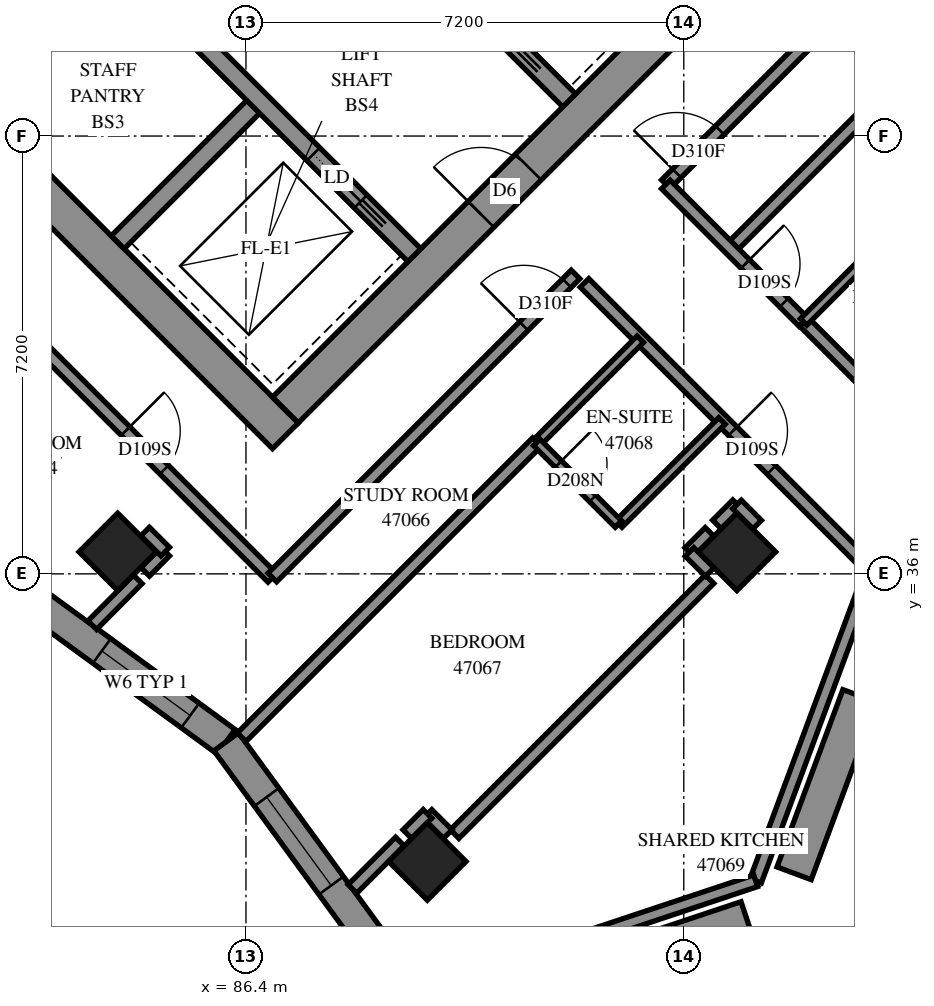
"""IFC4 building model, lengths in metres.
Left out: names, types, materials, properties, quantities, classifications, styles, units other than length and angle.
Written with IfcOpenShell. Run it as: python <this file> out.ifc"""

import sys

from ifc_helpers import new_model, si_unit, direction, frame, frame_2d, origin, origin_2d, place, context, subcontext, project, spatial, polyline, rectangle, outline, extrude, element, fill, save


model = new_model("IFC4")
c1 = context("Model", 3, precision=1e-05, world=origin(), true_north=direction((0.0, 1.0)))
c2 = subcontext(c1, "Body", "Model", "MODEL_VIEW")
j1 = project(units=[si_unit("LENGTHUNIT", "METRE"), si_unit("PLANEANGLEUNIT", "RADIAN")], contexts=[c1])
p1 = place(None, origin())
s1 = spatial("IfcSite", under=j1, at=p1, CompositionType="ELEMENT")
p2 = place(p1, origin())
s2 = spatial("IfcBuilding", under=s1, at=p2, CompositionType="ELEMENT")
p3 = place(p2, frame((0.0, 0.0, 172.8)))
s3 = spatial("IfcBuildingStorey", under=s2, at=p3, CompositionType="ELEMENT", Elevation=172.8)
for number, where, z_axis, x_axis in (
    (1, (84.291, 36.362, 0.0), (0.0, 0.0, 1.0), (0.707, -0.707, 0.0)),
    (2, (94.474, 36.362, 0.0), (0.0, 0.0, 1.0), (0.707, -0.707, 0.0)),
    (3, (89.382, 31.271, 0.0), (0.0, 0.0, 1.0), (0.707, -0.707, 0.0)),
):
    element("IfcColumn", number, at=place(p3, frame(where, z_axis=z_axis, x_axis=x_axis)), inside=s3, PredefinedType="COLUMN", context=c2, shape_type="SweptSolid", body=[
        extrude(rectangle(XDim=0.9, YDim=0.9, at=origin_2d()), origin(), (0.0, 0.0, 1.0), 3.1),
    ])
p4 = place(p3, frame((76.018, 49.302, -0.3), z_axis=(0.0, 0.0, 1.0), x_axis=(0.7071067812, -0.7071067812, 0.0)))
e4 = element("IfcWall", 4, at=p4, inside=s3, PredefinedType="SHEAR", context=c2, shape_type="SweptSolid", body=[
    extrude(rectangle(XDim=15.6, YDim=0.6, at=frame_2d((7.8, 0.0))), origin(), (0.0, 0.0, 1.0), 2.7),
])
p5 = place(p3, frame((87.049, 38.695, -0.3), z_axis=(0.0, 0.0, 1.0), x_axis=(0.7071067812, 0.7071067812, 0.0)))
e5 = element("IfcWall", 5, at=p5, inside=s3, PredefinedType="SHEAR", context=c2, shape_type="SweptSolid", body=[
    extrude(rectangle(XDim=14.4, YDim=0.6, at=frame_2d((7.2, 0.0))), origin(), (0.0, 0.0, 1.0), 2.7),
])
p6 = place(p5, frame((4.55, 0.0, 0.3)))
e6 = element("IfcOpeningElement", 6, at=p6, cuts=e5, PredefinedType="OPENING", context=c2, shape_type="SweptSolid", body=[
    extrude(rectangle(XDim=1.1, YDim=2.1, at=frame_2d((0.55, 1.05))), frame((0.0, 0.31, 0.0), z_axis=(0.0, -1.0, 0.0), x_axis=(1.0, 0.0, 0.0)), (0.0, 0.0, 1.0), 0.62),
])
p7 = place(p5, frame((11.35, 0.0, 0.3)))
e7 = element("IfcOpeningElement", 7, at=p7, cuts=e5, PredefinedType="OPENING", context=c2, shape_type="SweptSolid", body=[
    extrude(rectangle(XDim=1.1, YDim=2.1, at=frame_2d((0.55, 1.05))), frame((0.0, 0.31, 0.0), z_axis=(0.0, -1.0, 0.0), x_axis=(1.0, 0.0, 0.0)), (0.0, 0.0, 1.0), 0.62),
])
for number, where, z_axis, x_axis in (
    (8, (81.746, 43.999, 0.0), (0.0, 0.0, 1.0), (0.707, 0.707, 0.0)),
    (9, (84.291, 41.453, 0.0), (0.0, 0.0, 1.0), (0.707, 0.707, 0.0)),
):
    element("IfcWall", number, at=place(p3, frame(where, z_axis=z_axis, x_axis=x_axis)), inside=s3, PredefinedType="SOLIDWALL", context=c2, shape_type="SweptSolid", body=[
        extrude(rectangle(XDim=3.3, YDim=0.3, at=frame_2d((1.65, 0.0))), origin(), (0.0, 0.0, 1.0), 3.1),
    ])
p8 = place(p3, frame((78.988, 51.423, 0.0), z_axis=(0.0, 0.0, 1.0), x_axis=(0.7071067812, -0.7071067812, 0.0)))
e10 = element("IfcWall", 10, at=p8, inside=s3, PredefinedType="SOLIDWALL", context=c2, shape_type="SweptSolid", body=[
    extrude(rectangle(XDim=14.4, YDim=0.3, at=frame_2d((7.2, 0.0))), origin(), (0.0, 0.0, 1.0), 3.1),
])
p9 = place(p8, frame((1.35, 0.0, 0.0)))
e11 = element("IfcOpeningElement", 11, at=p9, cuts=e10, PredefinedType="OPENING", context=c2, shape_type="SweptSolid", body=[
    extrude(rectangle(XDim=0.9, YDim=2.1, at=frame_2d((0.45, 1.05))), frame((0.0, 0.16, 0.0), z_axis=(0.0, -1.0, 0.0), x_axis=(1.0, 0.0, 0.0)), (0.0, 0.0, 1.0), 0.32),
])
p10 = place(p8, frame((4.95, 0.0, 0.0)))
e12 = element("IfcOpeningElement", 12, at=p10, cuts=e10, PredefinedType="OPENING", context=c2, shape_type="SweptSolid", body=[
    extrude(rectangle(XDim=0.9, YDim=2.1, at=frame_2d((0.45, 1.05))), frame((0.0, 0.16, 0.0), z_axis=(0.0, -1.0, 0.0), x_axis=(1.0, 0.0, 0.0)), (0.0, 0.0, 1.0), 0.32),
])
p11 = place(p8, frame((8.55, 0.0, 0.0)))
e13 = element("IfcOpeningElement", 13, at=p11, cuts=e10, PredefinedType="OPENING", context=c2, shape_type="SweptSolid", body=[
    extrude(rectangle(XDim=0.9, YDim=2.1, at=frame_2d((0.45, 1.05))), frame((0.0, 0.16, 0.0), z_axis=(0.0, -1.0, 0.0), x_axis=(1.0, 0.0, 0.0)), (0.0, 0.0, 1.0), 0.32),
])
p12 = place(p8, frame((12.05, 0.0, 0.0)))
e14 = element("IfcOpeningElement", 14, at=p12, cuts=e10, PredefinedType="OPENING", context=c2, shape_type="SweptSolid", body=[
    extrude(rectangle(XDim=1.1, YDim=2.1, at=frame_2d((0.55, 1.05))), frame((0.0, 0.16, 0.0), z_axis=(0.0, -1.0, 0.0), x_axis=(1.0, 0.0, 0.0)), (0.0, 0.0, 1.0), 0.32),
])
p13 = place(p3, frame((81.534, 53.969, 0.0), z_axis=(0.0, 0.0, 1.0), x_axis=(0.707103309, -0.7071102534, 0.0)))
e15 = element("IfcWall", 15, at=p13, inside=s3, PredefinedType="SOLIDWALL", context=c2, shape_type="SweptSolid", body=[
    extrude(rectangle(XDim=14.4, YDim=0.3, at=frame_2d((7.2, 0.0))), origin(), (0.0, 0.0, 1.0), 3.1),
])
p14 = place(p13, frame((1.25, 0.0, 0.0)))
e16 = element("IfcOpeningElement", 16, at=p14, cuts=e15, PredefinedType="OPENING", context=c2, shape_type="SweptSolid", body=[
    extrude(rectangle(XDim=1.1, YDim=2.1, at=frame_2d((0.55, 1.05))), frame((0.0, 0.16, 0.0), z_axis=(0.0, -1.0, 0.0), x_axis=(1.0, 0.0, 0.0)), (0.0, 0.0, 1.0), 0.32),
])
p15 = place(p13, frame((4.85, 0.0, 0.0)))
e17 = element("IfcOpeningElement", 17, at=p15, cuts=e15, PredefinedType="OPENING", context=c2, shape_type="SweptSolid", body=[
    extrude(rectangle(XDim=1.1, YDim=2.1, at=frame_2d((0.55, 1.05))), frame((0.0, 0.16, 0.0), z_axis=(0.0, -1.0, 0.0), x_axis=(1.0, 0.0, 0.0)), (0.0, 0.0, 1.0), 0.32),
])
p16 = place(p13, frame((8.45, 0.0, 0.0)))
e18 = element("IfcOpeningElement", 18, at=p16, cuts=e15, PredefinedType="OPENING", context=c2, shape_type="SweptSolid", body=[
    extrude(rectangle(XDim=1.1, YDim=2.1, at=frame_2d((0.55, 1.05))), frame((0.0, 0.16, 0.0), z_axis=(0.0, -1.0, 0.0), x_axis=(1.0, 0.0, 0.0)), (0.0, 0.0, 1.0), 0.32),
])
p17 = place(p13, frame((12.05, 0.0, 0.0)))
e19 = element("IfcOpeningElement", 19, at=p17, cuts=e15, PredefinedType="OPENING", context=c2, shape_type="SweptSolid", body=[
    extrude(rectangle(XDim=1.1, YDim=2.1, at=frame_2d((0.55, 1.05))), frame((0.0, 0.16, 0.0), z_axis=(0.0, -1.0, 0.0), x_axis=(1.0, 0.0, 0.0)), (0.0, 0.0, 1.0), 0.32),
])
p18 = place(p3, frame((82.771, 35.652, 0.0), z_axis=(0.0, 0.0, 1.0), x_axis=(0.807533929, -0.58982112, 0.0)))
e20 = element("IfcWall", 20, at=p18, inside=s3, PredefinedType="SOLIDWALL", context=c2, shape_type="SweptSolid", body=[
    extrude(outline(polyline([(-0.039, -0.25), (4.053, -0.25), (4.131, 0.25), (0.039, 0.25), (-0.039, -0.25)])), origin(), (0.0, 0.0, 1.0), 3.1),
])
p19 = place(p18, frame((1.559, 0.0, 0.7)))
e21 = element("IfcOpeningElement", 21, at=p19, cuts=e20, PredefinedType="OPENING", context=c2, shape_type="SweptSolid", body=[
    extrude(rectangle(XDim=1.8, YDim=2.2, at=frame_2d((0.9, 1.1))), frame((0.0, 0.26, 0.0), z_axis=(0.0, -1.0, 0.0), x_axis=(1.0, 0.0, 0.0)), (0.0, 0.0, 1.0), 0.52),
])
p20 = place(p3, frame((86.075, 33.239, 0.0), z_axis=(0.0, 0.0, 1.0), x_axis=(0.5898094806, -0.8075424302, 0.0)))
e22 = element("IfcWall", 22, at=p20, inside=s3, PredefinedType="SOLIDWALL", context=c2, shape_type="SweptSolid", body=[
    extrude(outline(polyline([(0.039, -0.25), (4.131, -0.25), (4.053, 0.25), (-0.039, 0.25), (0.039, -0.25)])), origin(), (0.0, 0.0, 1.0), 3.1),
])
p21 = place(p20, frame((1.127, 0.0, 0.7)))
e23 = element("IfcOpeningElement", 23, at=p21, cuts=e22, PredefinedType="OPENING", context=c2, shape_type="SweptSolid", body=[
    extrude(rectangle(XDim=1.8, YDim=2.1, at=frame_2d((0.9, 1.05))), frame((0.0, 0.26, 0.0), z_axis=(0.0, -1.0, 0.0), x_axis=(1.0, 0.0, 0.0)), (0.0, 0.0, 1.0), 0.52),
])
p22 = place(p3, frame((96.623, 35.909, 0.0), z_axis=(0.0, 0.0, 1.0), x_axis=(-0.3481832062, -0.9374265064, 0.0)))
e24 = element("IfcWall", 24, at=p22, inside=s3, PredefinedType="PARAPET", context=c2, shape_type="SweptSolid", body=[
    extrude(outline(polyline([(-0.046, -0.1), (5.24, -0.1), (5.336, 0.1), (0.046, 0.1), (-0.046, -0.1)])), origin(), (0.0, 0.0, 1.0), 0.25),
])
p23 = place(p3, frame((94.782, 30.952, 0.0), z_axis=(0.0, 0.0, 1.0), x_axis=(-0.9486813956, -0.3162334732, 0.0)))
e25 = element("IfcWall", 25, at=p23, inside=s3, PredefinedType="PARAPET", context=c2, shape_type="SweptSolid", body=[
    extrude(outline(polyline([(0.048, -0.1), (5.257, -0.1), (5.257, 0.1), (-0.048, 0.1), (0.048, -0.1)])), origin(), (0.0, 0.0, 1.0), 0.25),
])
p24 = place(p3, frame((96.498, 33.992, 0.0), z_axis=(0.0, 0.0, 1.0), x_axis=(-0.3481905653, -0.937423773, 0.0)))
e26 = element("IfcWall", 26, at=p24, inside=s3, PredefinedType="SOLIDWALL", context=c2, shape_type="SweptSolid", body=[
    extrude(rectangle(XDim=3.111, YDim=0.6, at=frame_2d((1.555, 0.0))), origin(), (0.0, 0.0, 1.0), 0.65),
])
p25 = place(p3, frame((94.366, 41.348, 0.0), z_axis=(0.0, 0.0, 1.0), x_axis=(0.7071108825, 0.7071026798, 0.0)))
e27 = element("IfcWall", 27, at=p25, inside=s3, PredefinedType="PARTITIONING", context=c2, shape_type="SweptSolid", body=[
    extrude(rectangle(XDim=12.191, YDim=0.2, at=frame_2d((6.096, 0.0))), origin(), (0.0, 0.0, 1.0), 3.1),
])
p26 = place(p3, frame((91.967, 40.785, 0.0), z_axis=(0.0, 0.0, 1.0), x_axis=(0.7071067812, -0.7071067812, 0.0)))
e28 = element("IfcWall", 28, at=p26, inside=s3, PredefinedType="PARTITIONING", context=c2, shape_type="SweptSolid", body=[
    extrude(rectangle(XDim=12.1, YDim=0.2, at=frame_2d((6.05, 0.0))), origin(), (0.0, 0.0, 1.0), 3.1),
])
p27 = place(p26, frame((3.448, 0.0, 0.0)))
e29 = element("IfcOpeningElement", 29, at=p27, cuts=e28, PredefinedType="OPENING", context=c2, shape_type="SweptSolid", body=[
    extrude(rectangle(XDim=0.9, YDim=2.1, at=frame_2d((0.45, 1.05))), frame((0.0, 0.11, 0.0), z_axis=(0.0, -1.0, 0.0), x_axis=(1.0, 0.0, 0.0)), (0.0, 0.0, 1.0), 0.22),
])
p28 = place(p26, frame((8.457, 0.0, 0.0)))
e30 = element("IfcOpeningElement", 30, at=p28, cuts=e28, PredefinedType="OPENING", context=c2, shape_type="SweptSolid", body=[
    extrude(rectangle(XDim=1.0, YDim=2.1, at=frame_2d((0.5, 1.05))), frame((0.0, 0.11, 0.0), z_axis=(0.0, -1.0, 0.0), x_axis=(1.0, 0.0, 0.0)), (0.0, 0.0, 1.0), 0.22),
])
p29 = place(p3, frame((93.306, 42.408, 0.0), z_axis=(0.0, 0.0, 1.0), x_axis=(0.7071067812, 0.7071067812, 0.0)))
e31 = element("IfcWall", 31, at=p29, inside=s3, PredefinedType="PARTITIONING", context=c2, shape_type="SweptSolid", body=[
    extrude(rectangle(XDim=9.45, YDim=0.2, at=frame_2d((4.725, 0.0))), origin(), (0.0, 0.0, 1.0), 3.1),
])
p30 = place(p29, frame((0.253, 0.0, 0.0)))
e32 = element("IfcOpeningElement", 32, at=p30, cuts=e31, PredefinedType="OPENING", context=c2, shape_type="SweptSolid", body=[
    extrude(rectangle(XDim=1.0, YDim=2.1, at=frame_2d((0.5, 1.05))), frame((0.0, 0.11, 0.0), z_axis=(0.0, -1.0, 0.0), x_axis=(1.0, 0.0, 0.0)), (0.0, 0.0, 1.0), 0.22),
])
p31 = place(p3, frame((80.899, 41.869, 0.0), z_axis=(0.0, 0.0, 1.0), x_axis=(0.7071067812, -0.7071067812, 0.0)))
e33 = element("IfcWall", 33, at=p31, inside=s3, PredefinedType="PARTITIONING", context=c2, shape_type="SweptSolid", body=[
    extrude(rectangle(XDim=8.392, YDim=0.2, at=frame_2d((4.196, 0.0))), origin(), (0.0, 0.0, 1.0), 3.1),
])
p32 = place(p31, frame((4.979, 0.0, 0.0)))
e34 = element("IfcOpeningElement", 34, at=p32, cuts=e33, PredefinedType="OPENING", context=c2, shape_type="SweptSolid", body=[
    extrude(rectangle(XDim=0.9, YDim=2.1, at=frame_2d((0.45, 1.05))), frame((0.0, 0.11, 0.0), z_axis=(0.0, -1.0, 0.0), x_axis=(1.0, 0.0, 0.0)), (0.0, 0.0, 1.0), 0.22),
])
p33 = place(p3, frame((86.834, 35.94, 0.0), z_axis=(0.0, 0.0, 1.0), x_axis=(0.7072486139, 0.7069649201, 0.0)))
e35 = element("IfcWall", 35, at=p33, inside=s3, PredefinedType="PARTITIONING", context=c2, shape_type="SweptSolid", body=[
    extrude(rectangle(XDim=7.05, YDim=0.2, at=frame_2d((3.525, 0.0))), origin(), (0.0, 0.0, 1.0), 3.1),
])
p34 = place(p33, frame((5.848, 0.0, 0.0)))
e36 = element("IfcOpeningElement", 36, at=p34, cuts=e35, PredefinedType="OPENING", context=c2, shape_type="SweptSolid", body=[
    extrude(rectangle(XDim=1.0, YDim=2.1, at=frame_2d((0.5, 1.05))), frame((0.0, 0.11, 0.0), z_axis=(0.0, -1.0, 0.0), x_axis=(1.0, 0.0, 0.0)), (0.0, 0.0, 1.0), 0.22),
])
p35 = place(p3, frame((86.33, 33.314, 0.0), z_axis=(0.0, 0.0, 1.0), x_axis=(0.7072524653, 0.7069610671, 0.0)))
e37 = element("IfcWall", 37, at=p35, inside=s3, PredefinedType="PARTITIONING", context=c2, shape_type="SweptSolid", body=[
    extrude(rectangle(XDim=6.864, YDim=0.2, at=frame_2d((3.432, 0.0))), origin(), (0.0, 0.0, 1.0), 3.1),
])
p36 = place(p3, frame((89.831, 31.721, 0.0), z_axis=(0.0, 0.0, 1.0), x_axis=(0.7071067812, 0.7071067812, 0.0)))
e38 = element("IfcWall", 38, at=p36, inside=s3, PredefinedType="PARTITIONING", context=c2, shape_type="SweptSolid", body=[
    extrude(rectangle(XDim=5.928, YDim=0.2, at=frame_2d((2.964, 0.0))), origin(), (0.0, 0.0, 1.0), 2.6),
])
p37 = place(p3, frame((94.923, 26.631, 0.0), z_axis=(0.0, 0.0, 1.0), x_axis=(0.7071067812, 0.7071067812, 0.0)))
e39 = element("IfcWall", 39, at=p37, inside=s3, PredefinedType="PARTITIONING", context=c2, shape_type="SweptSolid", body=[
    extrude(rectangle(XDim=5.926, YDim=0.2, at=frame_2d((2.963, 0.0))), origin(), (0.0, 0.0, 1.0), 3.1),
])
p38 = place(p3, frame((95.573, 40.148, 0.0), z_axis=(0.0, 0.0, 1.0), x_axis=(0.7068698107, -0.7073436723, 0.0)))
e40 = element("IfcWall", 40, at=p38, inside=s3, PredefinedType="PARTITIONING", context=c2, shape_type="SweptSolid", body=[
    extrude(rectangle(XDim=3.799, YDim=0.2, at=frame_2d((1.899, 0.0))), origin(), (0.0, 0.0, 1.0), 3.1),
])
p39 = place(p3, frame((93.305, 42.403, 0.0), z_axis=(0.0, 0.0, 1.0), x_axis=(0.7071067812, -0.7071067812, 0.0)))
e41 = element("IfcWall", 41, at=p39, inside=s3, PredefinedType="PARTITIONING", context=c2, shape_type="SweptSolid", body=[
    extrude(rectangle(XDim=3.199, YDim=0.2, at=frame_2d((1.599, 0.0))), origin(), (0.0, 0.0, 1.0), 3.1),
])
p40 = place(p39, frame((1.848, 0.0, 0.0)))
e42 = element("IfcOpeningElement", 42, at=p40, cuts=e41, PredefinedType="OPENING", context=c2, shape_type="SweptSolid", body=[
    extrude(rectangle(XDim=0.9, YDim=2.1, at=frame_2d((0.45, 1.05))), frame((0.0, 0.11, 0.0), z_axis=(0.0, -1.0, 0.0), x_axis=(1.0, 0.0, 0.0)), (0.0, 0.0, 1.0), 0.22),
])
for number, where, z_axis, x_axis in (
    (43, (95.571, 40.143, 0.0), (0.0, 0.0, 1.0), (0.707, 0.708, 0.0)),
    (44, (91.189, 38.161, 0.0), (0.0, 0.0, 1.0), (0.707, 0.708, 0.0)),
    (45, (92.531, 36.819, 0.0), (0.0, 0.0, 1.0), (0.708, 0.707, 0.0)),
):
    element("IfcWall", number, at=place(p3, frame(where, z_axis=z_axis, x_axis=x_axis)), inside=s3, PredefinedType="PARTITIONING", context=c2, shape_type="SweptSolid", body=[
        extrude(rectangle(XDim=2.4, YDim=0.15, at=frame_2d((1.2, 0.0))), origin(), (0.0, 0.0, 1.0), 3.1),
    ])
p41 = place(p3, frame((91.183, 38.161, 0.0), z_axis=(0.0, 0.0, 1.0), x_axis=(0.7071067812, -0.7071067812, 0.0)))
e46 = element("IfcWall", 46, at=p41, inside=s3, PredefinedType="PARTITIONING", context=c2, shape_type="SweptSolid", body=[
    extrude(rectangle(XDim=1.898, YDim=0.15, at=frame_2d((0.949, 0.0))), origin(), (0.0, 0.0, 1.0), 3.1),
])
p42 = place(p41, frame((0.501, 0.0, 0.0)))
e47 = element("IfcOpeningElement", 47, at=p42, cuts=e46, PredefinedType="OPENING", context=c2, shape_type="SweptSolid", body=[
    extrude(rectangle(XDim=0.8, YDim=2.1, at=frame_2d((0.4, 1.05))), frame((0.0, 0.085, 0.0), z_axis=(0.0, -1.0, 0.0), x_axis=(1.0, 0.0, 0.0)), (0.0, 0.0, 1.0), 0.17),
])
p43 = place(p3, frame((88.152, 30.819, 0.0), z_axis=(0.0, 0.0, 1.0), x_axis=(0.7070614204, 0.7071521391, 0.0)))
e48 = element("IfcWall", 48, at=p43, inside=s3, PredefinedType="PARTITIONING", context=c2, shape_type="SweptSolid", body=[
    extrude(rectangle(XDim=1.102, YDim=0.2, at=frame_2d((0.551, 0.0))), origin(), (0.0, 0.0, 1.0), 3.1),
])
p44 = place(p3, frame((83.872, 35.157, 0.0), z_axis=(0.0, 0.0, 1.0), x_axis=(0.7052194116, 0.7089891265, 0.0)))
e49 = element("IfcWall", 49, at=p44, inside=s3, PredefinedType="PARTITIONING", context=c2, shape_type="SweptSolid", body=[
    extrude(rectangle(XDim=1.061, YDim=0.2, at=frame_2d((0.53, 0.0))), origin(), (0.0, 0.0, 1.0), 3.1),
])
for number, where, z_axis, x_axis in (
    (50, (94.145, 36.813, 0.0), (0.0, 0.0, 1.0), (0.707, 0.707, 0.0)),
    (51, (89.386, 32.052, 0.0), (0.0, 0.0, 1.0), (0.707, -0.707, 0.0)),
    (52, (89.053, 31.721, 0.0), (0.0, 0.0, 1.0), (0.707, 0.707, 0.0)),
    (53, (93.691, 36.359, 0.0), (0.0, 0.0, 1.0), (0.707, 0.707, 0.0)),
):
    element("IfcWall", number, at=place(p3, frame(where, z_axis=z_axis, x_axis=x_axis)), inside=s3, PredefinedType="PARTITIONING", context=c2, shape_type="SweptSolid", body=[
        extrude(rectangle(XDim=0.469, YDim=0.2, at=frame_2d((0.235, 0.0))), origin(), (0.0, 0.0, 1.0), 3.1),
    ])
for number, where, z_axis, x_axis in (
    (54, (94.476, 37.142, 0.0), (0.0, 0.0, 1.0), (0.705, -0.709, 0.0)),
    (55, (84.742, 36.034, 0.0), (0.0, 0.0, 1.0), (0.705, 0.709, 0.0)),
    (56, (93.695, 36.361, 0.0), (0.0, 0.0, 1.0), (0.709, -0.705, 0.0)),
):
    element("IfcWall", number, at=place(p3, frame(where, z_axis=z_axis, x_axis=x_axis)), inside=s3, PredefinedType="PARTITIONING", context=c2, shape_type="SweptSolid", body=[
        extrude(rectangle(XDim=0.468, YDim=0.2, at=frame_2d((0.234, 0.0))), origin(), (0.0, 0.0, 1.0), 3.1),
    ])
p45 = place(p3, frame((84.742, 36.696, 0.0), z_axis=(0.0, 0.0, 1.0), x_axis=(0.7071067812, -0.7071067812, 0.0)))
e57 = element("IfcWall", 57, at=p45, inside=s3, PredefinedType="PARTITIONING", context=c2, shape_type="SweptSolid", body=[
    extrude(rectangle(XDim=0.467, YDim=0.2, at=frame_2d((0.233, 0.0))), origin(), (0.0, 0.0, 1.0), 3.1),
])
p46 = place(p3, frame((94.636, 30.324, 0.0), z_axis=(0.0, 0.0, 1.0), x_axis=(-0.9486862934, -0.31621878, 0.0)))
e58 = element("IfcWall", 58, at=p46, inside=s3, PredefinedType="SOLIDWALL", context=c2, shape_type="SweptSolid", body=[
    extrude(outline(polyline([(0.0, -0.3), (3.338, -0.3), (3.338, 0.3), (0.0, 0.3), (0.0, -0.3)])), origin(), (0.0, 0.0, 1.0), 0.65),
])
p47 = place(p21, origin())
e59 = element("IfcWindow", 59, at=p47, inside=s3, PartitioningType="SINGLE_PANEL", PredefinedType="WINDOW", context=c2, shape_type="SweptSolid", body=[
    extrude(rectangle(XDim=1.8, YDim=2.1, at=frame_2d((0.9, 1.05))), frame((0.0, 0.18, 0.0), z_axis=(0.0, -1.0, 0.0), x_axis=(1.0, 0.0, 0.0)), (0.0, 0.0, 1.0), 0.06),
])
fill(e23, e59)
p48 = place(p6, origin())
e60 = element("IfcDoor", 60, at=p48, inside=s3, OperationType="DOUBLE_DOOR_SINGLE_SWING", PredefinedType="DOOR", context=c2, shape_type="SweptSolid", body=[
    extrude(rectangle(XDim=1.1, YDim=2.1, at=frame_2d((0.55, 1.05))), frame((0.0, 0.025, 0.0), z_axis=(0.0, -1.0, 0.0), x_axis=(1.0, 0.0, 0.0)), (0.0, 0.0, 1.0), 0.05),
])
fill(e6, e60)
p49 = place(p12, origin())
e61 = element("IfcDoor", 61, at=p49, inside=s3, OperationType="SLIDING_TO_RIGHT", PredefinedType="DOOR", context=c2, shape_type="SweptSolid", body=[
    extrude(rectangle(XDim=1.1, YDim=2.1, at=frame_2d((0.55, 1.05))), frame((0.0, 0.025, 0.0), z_axis=(0.0, -1.0, 0.0), x_axis=(1.0, 0.0, 0.0)), (0.0, 0.0, 1.0), 0.05),
])
fill(e14, e61)
p50 = place(p30, origin())
e62 = element("IfcDoor", 62, at=p50, inside=s3, OperationType="SINGLE_SWING_RIGHT", PredefinedType="DOOR", context=c2, shape_type="SweptSolid", body=[
    extrude(rectangle(XDim=1.0, YDim=2.1, at=frame_2d((0.5, 1.05))), frame((0.0, 0.025, 0.0), z_axis=(0.0, -1.0, 0.0), x_axis=(1.0, 0.0, 0.0)), (0.0, 0.0, 1.0), 0.05),
])
fill(e32, e62)
p51 = place(p40, origin())
e63 = element("IfcDoor", 63, at=p51, inside=s3, OperationType="SINGLE_SWING_RIGHT", PredefinedType="DOOR", context=c2, shape_type="SweptSolid", body=[
    extrude(rectangle(XDim=0.9, YDim=2.1, at=frame_2d((0.45, 1.05))), frame((0.0, 0.025, 0.0), z_axis=(0.0, -1.0, 0.0), x_axis=(1.0, 0.0, 0.0)), (0.0, 0.0, 1.0), 0.05),
])
fill(e42, e63)
p52 = place(p32, origin())
e64 = element("IfcDoor", 64, at=p52, inside=s3, OperationType="SINGLE_SWING_RIGHT", PredefinedType="DOOR", context=c2, shape_type="SweptSolid", body=[
    extrude(rectangle(XDim=0.9, YDim=2.1, at=frame_2d((0.45, 1.05))), frame((0.0, 0.025, 0.0), z_axis=(0.0, -1.0, 0.0), x_axis=(1.0, 0.0, 0.0)), (0.0, 0.0, 1.0), 0.05),
])
fill(e34, e64)
p53 = place(p34, origin())
e65 = element("IfcDoor", 65, at=p53, inside=s3, OperationType="SINGLE_SWING_RIGHT", PredefinedType="DOOR", context=c2, shape_type="SweptSolid", body=[
    extrude(rectangle(XDim=1.0, YDim=2.1, at=frame_2d((0.5, 1.05))), frame((0.0, 0.025, 0.0), z_axis=(0.0, -1.0, 0.0), x_axis=(1.0, 0.0, 0.0)), (0.0, 0.0, 1.0), 0.05),
])
fill(e36, e65)
p54 = place(p27, origin())
e66 = element("IfcDoor", 66, at=p54, inside=s3, OperationType="SINGLE_SWING_LEFT", PredefinedType="DOOR", context=c2, shape_type="SweptSolid", body=[
    extrude(rectangle(XDim=0.9, YDim=2.1, at=frame_2d((0.45, 1.05))), frame((0.0, 0.025, 0.0), z_axis=(0.0, -1.0, 0.0), x_axis=(1.0, 0.0, 0.0)), (0.0, 0.0, 1.0), 0.05),
])
fill(e29, e66)
p55 = place(p42, origin())
e67 = element("IfcDoor", 67, at=p55, inside=s3, OperationType="SINGLE_SWING_RIGHT", PredefinedType="DOOR", context=c2, shape_type="SweptSolid", body=[
    extrude(rectangle(XDim=0.8, YDim=2.1, at=frame_2d((0.4, 1.05))), frame((0.0, 0.025, 0.0), z_axis=(0.0, -1.0, 0.0), x_axis=(1.0, 0.0, 0.0)), (0.0, 0.0, 1.0), 0.05),
])
fill(e47, e67)
p56 = place(p19, origin())
e68 = element("IfcWindow", 68, at=p56, inside=s3, PartitioningType="SINGLE_PANEL", PredefinedType="WINDOW", context=c2, shape_type="SweptSolid", body=[
    extrude(rectangle(XDim=1.8, YDim=2.2, at=frame_2d((0.9, 1.1))), frame((0.0, 0.18, 0.0), z_axis=(0.0, -1.0, 0.0), x_axis=(1.0, 0.0, 0.0)), (0.0, 0.0, 1.0), 0.06),
])
fill(e21, e68)
save(model, sys.argv[1])
